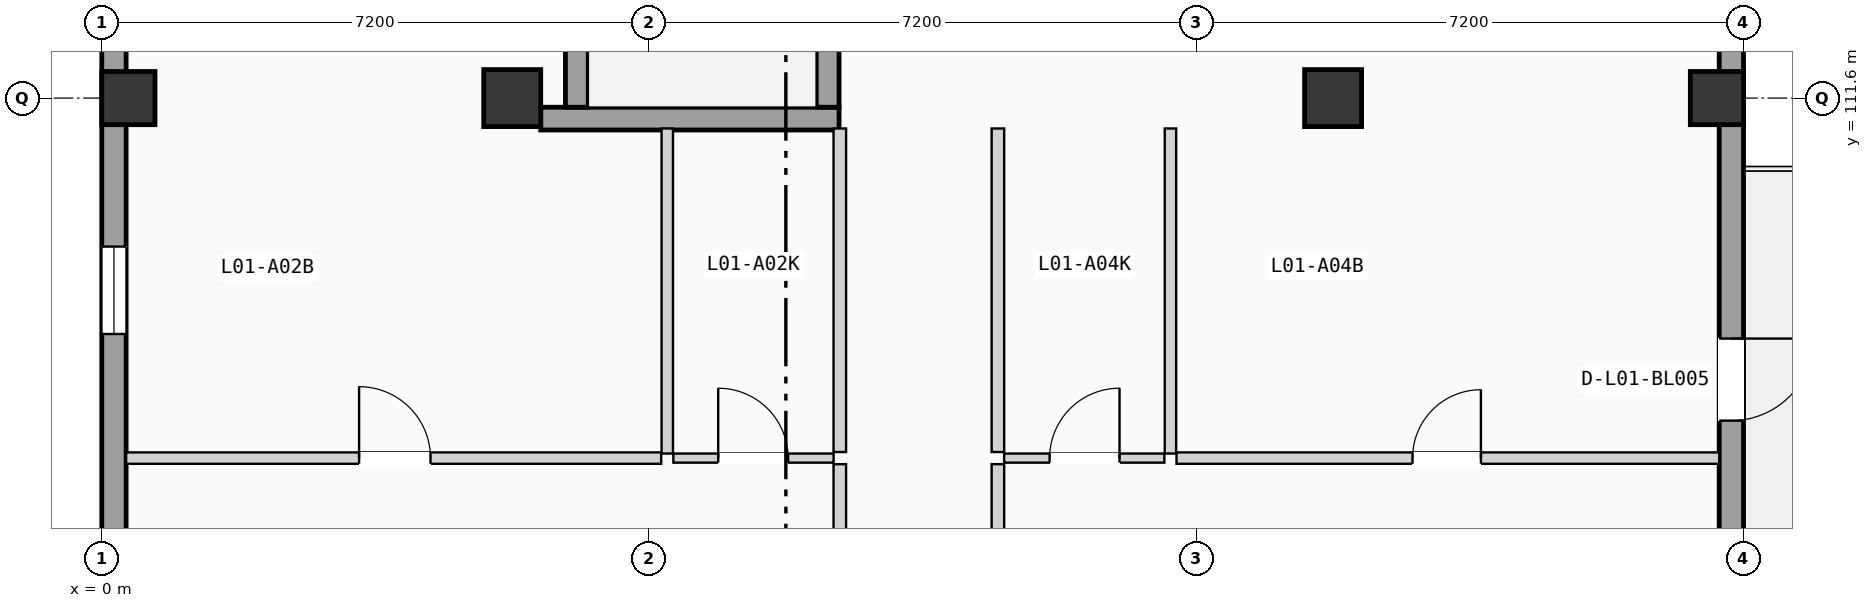
"""IFC4 building model, lengths in metres.
Left out: names, types, materials, properties, quantities, classifications, styles, units other than length and angle.
Written with IfcOpenShell. Run it as: python <this file> out.ifc"""

import sys

from ifc_helpers import new_model, si_unit, direction, frame, frame_2d, origin, origin_2d, place, context, subcontext, project, spatial, rectangle, extrude, element, fill, save


model = new_model("IFC4")
c1 = context("Model", 3, precision=1e-05, world=origin(), true_north=direction((0.0, 1.0)))
c2 = subcontext(c1, "Body", "Model", "MODEL_VIEW")
j1 = project(units=[si_unit("LENGTHUNIT", "METRE"), si_unit("PLANEANGLEUNIT", "RADIAN")], contexts=[c1])
p1 = place(None, origin())
s1 = spatial("IfcSite", under=j1, at=p1, CompositionType="ELEMENT")
p2 = place(p1, origin())
s2 = spatial("IfcBuilding", under=s1, at=p2, CompositionType="ELEMENT")
p3 = place(p2, frame((0.0, 0.0, 4.9)))
s3 = spatial("IfcBuildingStorey", under=s2, at=p3, CompositionType="ELEMENT", Elevation=4.9)
p4 = place(p3, frame((0.35, 111.6, 0.0), z_axis=(0.0, 0.0, 1.0), x_axis=(1.0, 0.0, 0.0)))
e1 = element("IfcColumn", 1, at=p4, inside=s3, PredefinedType="COLUMN", context=c2, shape_type="SweptSolid", body=[
    extrude(rectangle(XDim=0.7, YDim=0.7, at=origin_2d()), origin(), (0.0, 0.0, 1.0), 3.675),
])
for number, where, z_axis, x_axis in (
    (2, (5.4, 111.6, 0.0), (0.0, 0.0, 1.0), (1.0, 0.0, 0.0)),
    (3, (16.2, 111.6, 0.0), (0.0, 0.0, 1.0), (1.0, 0.0, 0.0)),
):
    element("IfcColumn", number, at=place(p3, frame(where, z_axis=z_axis, x_axis=x_axis)), inside=s3, PredefinedType="COLUMN", context=c2, shape_type="SweptSolid", body=[
        extrude(rectangle(XDim=0.75, YDim=0.75, at=origin_2d()), origin(), (0.0, 0.0, 1.0), 3.675),
    ])
p5 = place(p3, frame((21.25, 111.6, 0.0), z_axis=(0.0, 0.0, 1.0), x_axis=(1.0, 0.0, 0.0)))
e4 = element("IfcColumn", 4, at=p5, inside=s3, PredefinedType="COLUMN", context=c2, shape_type="SweptSolid", body=[
    extrude(rectangle(XDim=0.7, YDim=0.7, at=origin_2d()), origin(), (0.0, 0.0, 1.0), 3.675),
])
p6 = place(p3, frame((0.16, 68.72, 0.0), z_axis=(0.0, 0.0, 1.0), x_axis=(0.0, 1.0, 0.0)))
e5 = element("IfcWall", 5, at=p6, inside=s3, PredefinedType="SOLIDWALL", context=c2, shape_type="SweptSolid", body=[
    extrude(rectangle(XDim=49.76, YDim=0.32, at=frame_2d((24.88, 0.0))), origin(), (0.0, 0.0, 1.0), 3.415),
])
p7 = place(p6, frame((17.155, 0.0, 0.9)))
e6 = element("IfcOpeningElement", 6, at=p7, cuts=e5, PredefinedType="OPENING", context=c2, shape_type="SweptSolid", body=[
    extrude(rectangle(XDim=1.05, YDim=1.8, at=frame_2d((0.525, 0.9))), frame((0.0, 0.17, 0.0), z_axis=(0.0, -1.0, 0.0), x_axis=(1.0, 0.0, 0.0)), (0.0, 0.0, 1.0), 0.34),
])
p8 = place(p6, frame((9.97, 0.0, 0.9)))
e7 = element("IfcOpeningElement", 7, at=p8, cuts=e5, PredefinedType="OPENING", context=c2, shape_type="SweptSolid", body=[
    extrude(rectangle(XDim=1.15, YDim=1.2, at=frame_2d((0.575, 0.6))), frame((0.0, 0.17, 0.0), z_axis=(0.0, -1.0, 0.0), x_axis=(1.0, 0.0, 0.0)), (0.0, 0.0, 1.0), 0.34),
])
p9 = place(p6, frame((24.305, 0.0, 0.9)))
e8 = element("IfcOpeningElement", 8, at=p9, cuts=e5, PredefinedType="OPENING", context=c2, shape_type="SweptSolid", body=[
    extrude(rectangle(XDim=1.15, YDim=1.35, at=frame_2d((0.575, 0.675))), frame((0.0, 0.17, 0.0), z_axis=(0.0, -1.0, 0.0), x_axis=(1.0, 0.0, 0.0)), (0.0, 0.0, 1.0), 0.34),
])
p10 = place(p6, frame((33.584, 0.0, 0.9)))
e9 = element("IfcOpeningElement", 9, at=p10, cuts=e5, PredefinedType="OPENING", context=c2, shape_type="SweptSolid", body=[
    extrude(rectangle(XDim=1.15, YDim=1.5, at=frame_2d((0.575, 0.75))), frame((0.0, 0.17, 0.0), z_axis=(0.0, -1.0, 0.0), x_axis=(1.0, 0.0, 0.0)), (0.0, 0.0, 1.0), 0.34),
])
p11 = place(p6, frame((30.174, 0.0, 0.9)))
e10 = element("IfcOpeningElement", 10, at=p11, cuts=e5, PredefinedType="OPENING", context=c2, shape_type="SweptSolid", body=[
    extrude(rectangle(XDim=1.15, YDim=1.65, at=frame_2d((0.575, 0.825))), frame((0.0, 0.17, 0.0), z_axis=(0.0, -1.0, 0.0), x_axis=(1.0, 0.0, 0.0)), (0.0, 0.0, 1.0), 0.34),
])
p12 = place(p6, frame((39.776, 0.0, 0.9)))
e11 = element("IfcOpeningElement", 11, at=p12, cuts=e5, PredefinedType="OPENING", context=c2, shape_type="SweptSolid", body=[
    extrude(rectangle(XDim=1.15, YDim=1.8, at=frame_2d((0.575, 0.9))), frame((0.0, 0.17, 0.0), z_axis=(0.0, -1.0, 0.0), x_axis=(1.0, 0.0, 0.0)), (0.0, 0.0, 1.0), 0.34),
])
p13 = place(p3, frame((21.44, 68.72, 0.0), z_axis=(0.0, 0.0, 1.0), x_axis=(0.0, 1.0, 0.0)))
e12 = element("IfcWall", 12, at=p13, inside=s3, PredefinedType="SOLIDWALL", context=c2, shape_type="SweptSolid", body=[
    extrude(rectangle(XDim=49.76, YDim=0.32, at=frame_2d((24.88, 0.0))), origin(), (0.0, 0.0, 1.0), 3.415),
])
p14 = place(p13, frame((16.38, 0.0, 0.0)))
e13 = element("IfcOpeningElement", 13, at=p14, cuts=e12, PredefinedType="OPENING", context=c2, shape_type="SweptSolid", body=[
    extrude(rectangle(XDim=0.95, YDim=2.15, at=frame_2d((0.475, 1.075))), frame((0.0, 0.17, 0.0), z_axis=(0.0, -1.0, 0.0), x_axis=(1.0, 0.0, 0.0)), (0.0, 0.0, 1.0), 0.34),
])
p15 = place(p13, frame((9.92, 0.0, 0.9)))
e14 = element("IfcOpeningElement", 14, at=p15, cuts=e12, PredefinedType="OPENING", context=c2, shape_type="SweptSolid", body=[
    extrude(rectangle(XDim=1.25, YDim=1.2, at=frame_2d((0.625, 0.6))), frame((0.0, 0.17, 0.0), z_axis=(0.0, -1.0, 0.0), x_axis=(1.0, 0.0, 0.0)), (0.0, 0.0, 1.0), 0.34),
])
p16 = place(p13, frame((24.255, 0.0, 0.9)))
e15 = element("IfcOpeningElement", 15, at=p16, cuts=e12, PredefinedType="OPENING", context=c2, shape_type="SweptSolid", body=[
    extrude(rectangle(XDim=1.25, YDim=1.35, at=frame_2d((0.625, 0.675))), frame((0.0, 0.17, 0.0), z_axis=(0.0, -1.0, 0.0), x_axis=(1.0, 0.0, 0.0)), (0.0, 0.0, 1.0), 0.34),
])
p17 = place(p13, frame((33.534, 0.0, 0.9)))
e16 = element("IfcOpeningElement", 16, at=p17, cuts=e12, PredefinedType="OPENING", context=c2, shape_type="SweptSolid", body=[
    extrude(rectangle(XDim=1.25, YDim=1.5, at=frame_2d((0.625, 0.75))), frame((0.0, 0.17, 0.0), z_axis=(0.0, -1.0, 0.0), x_axis=(1.0, 0.0, 0.0)), (0.0, 0.0, 1.0), 0.34),
])
p18 = place(p13, frame((30.124, 0.0, 0.9)))
e17 = element("IfcOpeningElement", 17, at=p18, cuts=e12, PredefinedType="OPENING", context=c2, shape_type="SweptSolid", body=[
    extrude(rectangle(XDim=1.25, YDim=1.65, at=frame_2d((0.625, 0.825))), frame((0.0, 0.17, 0.0), z_axis=(0.0, -1.0, 0.0), x_axis=(1.0, 0.0, 0.0)), (0.0, 0.0, 1.0), 0.34),
])
p19 = place(p13, frame((38.636, 0.0, 0.0)))
e18 = element("IfcOpeningElement", 18, at=p19, cuts=e12, PredefinedType="OPENING", context=c2, shape_type="SweptSolid", body=[
    extrude(rectangle(XDim=1.08, YDim=2.18, at=frame_2d((0.54, 1.09))), frame((0.0, 0.17, 0.0), z_axis=(0.0, -1.0, 0.0), x_axis=(1.0, 0.0, 0.0)), (0.0, 0.0, 1.0), 0.34),
])
p20 = place(p3, frame((5.775, 111.33, 0.0), z_axis=(0.0, 0.0, 1.0), x_axis=(1.0, 0.0, 0.0)))
e19 = element("IfcWall", 19, at=p20, inside=s3, PredefinedType="SHEAR", context=c2, shape_type="SweptSolid", body=[
    extrude(rectangle(XDim=3.925, YDim=0.3, at=frame_2d((1.962, 0.0))), origin(), (0.0, 0.0, 1.0), 3.415),
])
p21 = place(p3, frame((6.25, 111.48, 0.0), z_axis=(0.0, 0.0, 1.0), x_axis=(0.0, 1.0, 0.0)))
e20 = element("IfcWall", 20, at=p21, inside=s3, PredefinedType="SHEAR", context=c2, shape_type="SweptSolid", body=[
    extrude(rectangle(XDim=7.0, YDim=0.3, at=frame_2d((3.5, 0.0))), origin(), (0.0, 0.0, 1.0), 3.415),
])
p22 = place(p3, frame((9.55, 111.48, 0.0), z_axis=(0.0, 0.0, 1.0), x_axis=(0.0, 1.0, 0.0)))
e21 = element("IfcWall", 21, at=p22, inside=s3, PredefinedType="SHEAR", context=c2, shape_type="SweptSolid", body=[
    extrude(rectangle(XDim=7.0, YDim=0.3, at=frame_2d((3.5, 0.0))), origin(), (0.0, 0.0, 1.0), 3.415),
])
p23 = place(p22, frame((5.625, 0.0, 0.0)))
e22 = element("IfcOpeningElement", 22, at=p23, cuts=e21, PredefinedType="OPENING", context=c2, shape_type="SweptSolid", body=[
    extrude(rectangle(XDim=1.15, YDim=2.12, at=frame_2d((0.575, 1.06))), frame((0.0, 0.16, 0.0), z_axis=(0.0, -1.0, 0.0), x_axis=(1.0, 0.0, 0.0)), (0.0, 0.0, 1.0), 0.32),
])
p24 = place(p3, frame((9.71, 101.627, 0.0), z_axis=(0.0, 0.0, 1.0), x_axis=(0.0, 1.0, 0.0)))
e23 = element("IfcWall", 23, at=p24, inside=s3, PredefinedType="PARTITIONING", context=c2, shape_type="SweptSolid", body=[
    extrude(rectangle(XDim=5.156, YDim=0.165, at=frame_2d((2.578, 0.0))), origin(), (0.0, 0.0, 1.0), 3.395),
])
p25 = place(p24, frame((2.088, 0.0, 0.0)))
e24 = element("IfcOpeningElement", 24, at=p25, cuts=e23, PredefinedType="OPENING", context=c2, shape_type="SweptSolid", body=[
    extrude(rectangle(XDim=0.98, YDim=2.08, at=frame_2d((0.49, 1.04))), frame((0.0, 0.093, 0.0), z_axis=(0.0, -1.0, 0.0), x_axis=(1.0, 0.0, 0.0)), (0.0, 0.0, 1.0), 0.185),
])
p26 = place(p3, frame((9.71, 106.943, 0.0), z_axis=(0.0, 0.0, 1.0), x_axis=(0.0, 1.0, 0.0)))
e25 = element("IfcWall", 25, at=p26, inside=s3, PredefinedType="PARTITIONING", context=c2, shape_type="SweptSolid", body=[
    extrude(rectangle(XDim=4.257, YDim=0.165, at=frame_2d((2.128, 0.0))), origin(), (0.0, 0.0, 1.0), 3.395),
])
p27 = place(p3, frame((11.79, 101.627, 0.0), z_axis=(0.0, 0.0, 1.0), x_axis=(0.0, 1.0, 0.0)))
e26 = element("IfcWall", 26, at=p27, inside=s3, PredefinedType="PARTITIONING", context=c2, shape_type="SweptSolid", body=[
    extrude(rectangle(XDim=5.156, YDim=0.165, at=frame_2d((2.578, 0.0))), origin(), (0.0, 0.0, 1.0), 3.395),
])
p28 = place(p27, frame((2.088, 0.0, 0.0)))
e27 = element("IfcOpeningElement", 27, at=p28, cuts=e26, PredefinedType="OPENING", context=c2, shape_type="SweptSolid", body=[
    extrude(rectangle(XDim=0.98, YDim=2.08, at=frame_2d((0.49, 1.04))), frame((0.0, 0.093, 0.0), z_axis=(0.0, -1.0, 0.0), x_axis=(1.0, 0.0, 0.0)), (0.0, 0.0, 1.0), 0.185),
])
p29 = place(p3, frame((11.79, 106.943, 0.0), z_axis=(0.0, 0.0, 1.0), x_axis=(0.0, 1.0, 0.0)))
e28 = element("IfcWall", 28, at=p29, inside=s3, PredefinedType="PARTITIONING", context=c2, shape_type="SweptSolid", body=[
    extrude(rectangle(XDim=4.257, YDim=0.165, at=frame_2d((2.128, 0.0))), origin(), (0.0, 0.0, 1.0), 3.395),
])
p30 = place(p3, frame((7.52, 106.863, 0.0), z_axis=(0.0, 0.0, 1.0), x_axis=(1.0, 0.0, 0.0)))
e29 = element("IfcWall", 29, at=p30, inside=s3, PredefinedType="PARTITIONING", context=c2, shape_type="SweptSolid", body=[
    extrude(rectangle(XDim=2.108, YDim=0.12, at=frame_2d((1.054, 0.0))), origin(), (0.0, 0.0, 1.0), 3.395),
])
p31 = place(p30, frame((0.59, 0.0, 0.0)))
e30 = element("IfcOpeningElement", 30, at=p31, cuts=e29, PredefinedType="OPENING", context=c2, shape_type="SweptSolid", body=[
    extrude(rectangle(XDim=0.92, YDim=2.02, at=frame_2d((0.46, 1.01))), frame((0.0, 0.07, 0.0), z_axis=(0.0, -1.0, 0.0), x_axis=(1.0, 0.0, 0.0)), (0.0, 0.0, 1.0), 0.14),
])
p32 = place(p3, frame((0.32, 106.863, 0.0), z_axis=(0.0, 0.0, 1.0), x_axis=(1.0, 0.0, 0.0)))
e31 = element("IfcWall", 31, at=p32, inside=s3, PredefinedType="PARTITIONING", context=c2, shape_type="SweptSolid", body=[
    extrude(rectangle(XDim=7.04, YDim=0.15, at=frame_2d((3.52, 0.0))), origin(), (0.0, 0.0, 1.0), 3.395),
])
p33 = place(p32, frame((3.065, 0.0, 0.0)))
e32 = element("IfcOpeningElement", 32, at=p33, cuts=e31, PredefinedType="OPENING", context=c2, shape_type="SweptSolid", body=[
    extrude(rectangle(XDim=0.94, YDim=2.06, at=frame_2d((0.47, 1.03))), frame((0.0, 0.085, 0.0), z_axis=(0.0, -1.0, 0.0), x_axis=(1.0, 0.0, 0.0)), (0.0, 0.0, 1.0), 0.17),
])
p34 = place(p3, frame((7.44, 106.923, 0.0), z_axis=(0.0, 0.0, 1.0), x_axis=(0.0, 1.0, 0.0)))
e33 = element("IfcWall", 33, at=p34, inside=s3, PredefinedType="PARTITIONING", context=c2, shape_type="SweptSolid", body=[
    extrude(rectangle(XDim=4.277, YDim=0.15, at=frame_2d((2.138, 0.0))), origin(), (0.0, 0.0, 1.0), 3.395),
])
p35 = place(p3, frame((11.872, 106.863, 0.0), z_axis=(0.0, 0.0, 1.0), x_axis=(1.0, 0.0, 0.0)))
e34 = element("IfcWall", 34, at=p35, inside=s3, PredefinedType="PARTITIONING", context=c2, shape_type="SweptSolid", body=[
    extrude(rectangle(XDim=2.108, YDim=0.12, at=frame_2d((1.054, 0.0))), origin(), (0.0, 0.0, 1.0), 3.395),
])
p36 = place(p35, frame((0.598, 0.0, 0.0)))
e35 = element("IfcOpeningElement", 35, at=p36, cuts=e34, PredefinedType="OPENING", context=c2, shape_type="SweptSolid", body=[
    extrude(rectangle(XDim=0.92, YDim=2.02, at=frame_2d((0.46, 1.01))), frame((0.0, 0.07, 0.0), z_axis=(0.0, -1.0, 0.0), x_axis=(1.0, 0.0, 0.0)), (0.0, 0.0, 1.0), 0.14),
])
p37 = place(p3, frame((14.14, 106.863, 0.0), z_axis=(0.0, 0.0, 1.0), x_axis=(1.0, 0.0, 0.0)))
e36 = element("IfcWall", 36, at=p37, inside=s3, PredefinedType="PARTITIONING", context=c2, shape_type="SweptSolid", body=[
    extrude(rectangle(XDim=7.14, YDim=0.15, at=frame_2d((3.57, 0.0))), origin(), (0.0, 0.0, 1.0), 3.395),
])
p38 = place(p37, frame((3.105, 0.0, 0.0)))
e37 = element("IfcOpeningElement", 37, at=p38, cuts=e36, PredefinedType="OPENING", context=c2, shape_type="SweptSolid", body=[
    extrude(rectangle(XDim=0.9, YDim=2.04, at=frame_2d((0.45, 1.02))), frame((0.0, 0.085, 0.0), z_axis=(0.0, -1.0, 0.0), x_axis=(1.0, 0.0, 0.0)), (0.0, 0.0, 1.0), 0.17),
])
p39 = place(p3, frame((14.06, 106.923, 0.0), z_axis=(0.0, 0.0, 1.0), x_axis=(0.0, 1.0, 0.0)))
e38 = element("IfcWall", 38, at=p39, inside=s3, PredefinedType="PARTITIONING", context=c2, shape_type="SweptSolid", body=[
    extrude(rectangle(XDim=4.277, YDim=0.15, at=frame_2d((2.138, 0.0))), origin(), (0.0, 0.0, 1.0), 3.395),
])
p40 = place(p12, origin())
e39 = element("IfcWindow", 39, at=p40, inside=s3, PartitioningType="SINGLE_PANEL", PredefinedType="WINDOW", context=c2, shape_type="SweptSolid", body=[
    extrude(rectangle(XDim=1.15, YDim=1.8, at=frame_2d((0.575, 0.9))), frame((0.0, 0.03, 0.0), z_axis=(0.0, -1.0, 0.0), x_axis=(1.0, 0.0, 0.0)), (0.0, 0.0, 1.0), 0.06),
])
fill(e11, e39)
p41 = place(p19, frame((1.08, 0.0, 0.0), z_axis=(0.0, 0.0, 1.0), x_axis=(-1.0, 0.0, 0.0)))
e40 = element("IfcDoor", 40, at=p41, inside=s3, OperationType="SINGLE_SWING_RIGHT", PredefinedType="DOOR", context=c2, shape_type="SweptSolid", body=[
    extrude(rectangle(XDim=1.08, YDim=2.18, at=frame_2d((0.54, 1.09))), frame((0.0, 0.025, 0.0), z_axis=(0.0, -1.0, 0.0), x_axis=(1.0, 0.0, 0.0)), (0.0, 0.0, 1.0), 0.05),
])
fill(e18, e40)
p42 = place(p31, origin())
e41 = element("IfcDoor", 41, at=p42, inside=s3, OperationType="SINGLE_SWING_LEFT", PredefinedType="DOOR", context=c2, shape_type="SweptSolid", body=[
    extrude(rectangle(XDim=0.92, YDim=2.02, at=frame_2d((0.46, 1.01))), frame((0.0, 0.025, 0.0), z_axis=(0.0, -1.0, 0.0), x_axis=(1.0, 0.0, 0.0)), (0.0, 0.0, 1.0), 0.05),
])
fill(e30, e41)
p43 = place(p33, origin())
e42 = element("IfcDoor", 42, at=p43, inside=s3, OperationType="SINGLE_SWING_LEFT", PredefinedType="DOOR", context=c2, shape_type="SweptSolid", body=[
    extrude(rectangle(XDim=0.94, YDim=2.06, at=frame_2d((0.47, 1.03))), frame((0.0, 0.025, 0.0), z_axis=(0.0, -1.0, 0.0), x_axis=(1.0, 0.0, 0.0)), (0.0, 0.0, 1.0), 0.05),
])
fill(e32, e42)
p44 = place(p36, origin())
e43 = element("IfcDoor", 43, at=p44, inside=s3, OperationType="SINGLE_SWING_RIGHT", PredefinedType="DOOR", context=c2, shape_type="SweptSolid", body=[
    extrude(rectangle(XDim=0.92, YDim=2.02, at=frame_2d((0.46, 1.01))), frame((0.0, 0.025, 0.0), z_axis=(0.0, -1.0, 0.0), x_axis=(1.0, 0.0, 0.0)), (0.0, 0.0, 1.0), 0.05),
])
fill(e35, e43)
p45 = place(p38, origin())
e44 = element("IfcDoor", 44, at=p45, inside=s3, OperationType="SINGLE_SWING_RIGHT", PredefinedType="DOOR", context=c2, shape_type="SweptSolid", body=[
    extrude(rectangle(XDim=0.9, YDim=2.04, at=frame_2d((0.45, 1.02))), frame((0.0, 0.025, 0.0), z_axis=(0.0, -1.0, 0.0), x_axis=(1.0, 0.0, 0.0)), (0.0, 0.0, 1.0), 0.05),
])
fill(e37, e44)
save(model, sys.argv[1])
